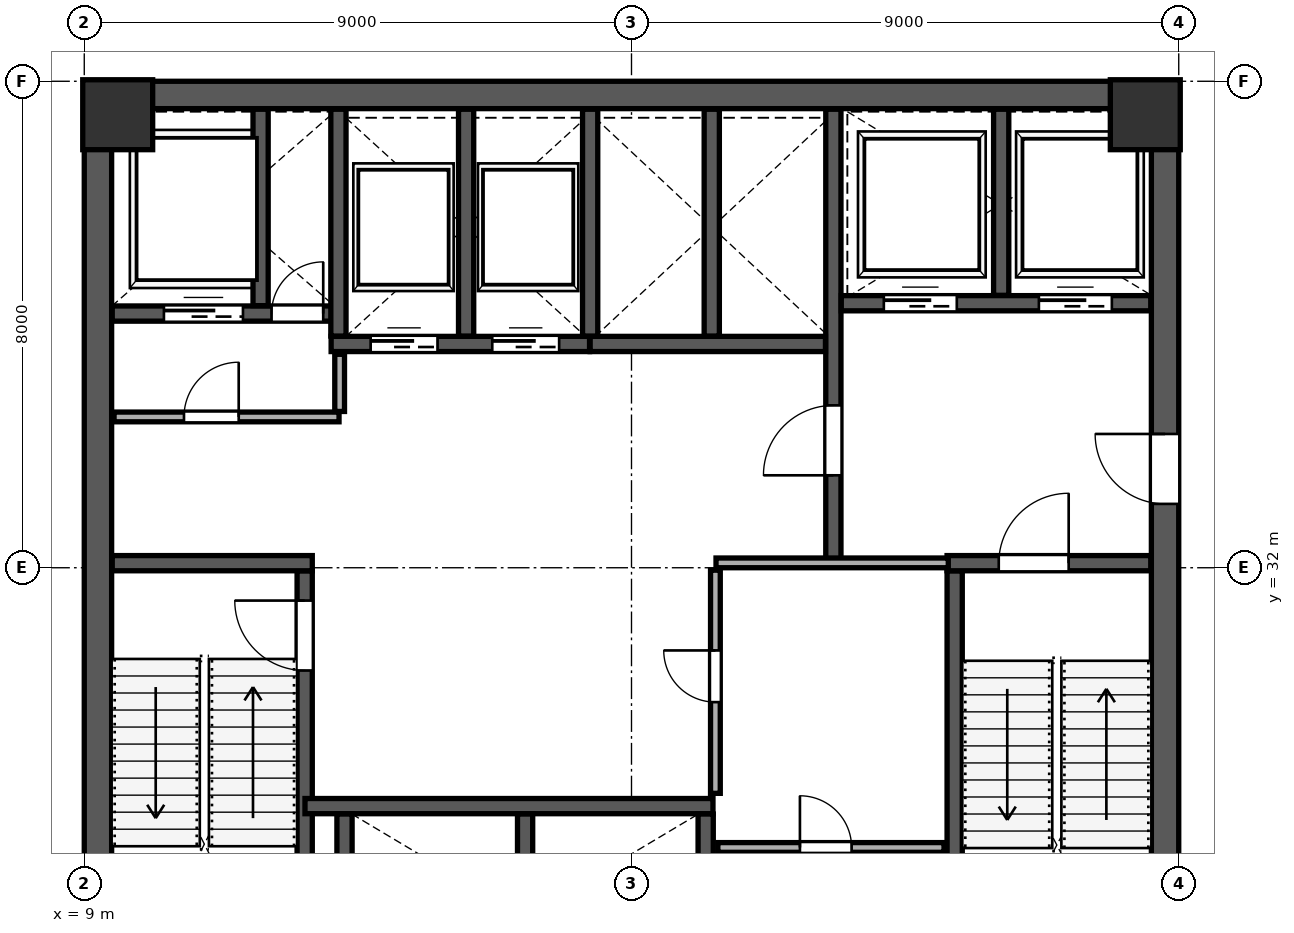
"""IFC4 building model, lengths in metres.
Left out: names, types, materials, properties, quantities, classifications, styles, units other than length and angle.
Written with IfcOpenShell. Run it as: python <this file> out.ifc"""

import sys

from ifc_helpers import new_model, si_unit, direction, frame, frame_2d, origin, origin_2d, place, context, subcontext, project, spatial, rectangle, extrude, source, transform, mapped, element, fill, save


model = new_model("IFC4")
c1 = context("Model", 3, precision=1e-05, world=origin(), true_north=direction((0.0, 1.0)))
c2 = subcontext(c1, "Body", "Model", "MODEL_VIEW")
j1 = project(units=[si_unit("LENGTHUNIT", "METRE"), si_unit("PLANEANGLEUNIT", "RADIAN")], contexts=[c1])
p1 = place(None, origin())
s1 = spatial("IfcSite", under=j1, at=p1, CompositionType="ELEMENT")
p2 = place(p1, origin())
s2 = spatial("IfcBuilding", under=s1, at=p2, CompositionType="ELEMENT")
p3 = place(p2, frame((0.0, 0.0, 133.0)))
s3 = spatial("IfcBuildingStorey", under=s2, at=p3, CompositionType="ELEMENT", Elevation=133.0)
m1 = source(origin(), c2, "Body", "SweptSolid", [
    extrude(rectangle(XDim=1.15, YDim=1.15, at=origin_2d()), origin(), (0.0, 0.0, 1.0), 4.198),
])
for number, where, z_axis, x_axis in (
    (1, (9.55, 39.45, 0.001), (0.0, 0.0, 1.0), (1.0, 0.0, 0.0)),
    (2, (26.45, 39.45, 0.001), (0.0, 0.0, 1.0), (1.0, 0.0, 0.0)),
):
    element("IfcColumn", number, at=place(p3, frame(where, z_axis=z_axis, x_axis=x_axis)), inside=s3, PredefinedType="COLUMN", context=c2, shape_type="MappedRepresentation", body=[
        mapped(m1, transform((0.0, 0.0, 0.0), scale=1.0)),
    ])
p4 = place(p3, frame((9.225, 24.45, 0.0), z_axis=(0.0, 0.0, 1.0), x_axis=(0.0, 1.0, 0.0)))
e3 = element("IfcWall", 3, at=p4, inside=s3, PredefinedType="SHEAR", context=c2, shape_type="SweptSolid", body=[
    extrude(rectangle(XDim=15.1, YDim=0.45, at=frame_2d((7.55, 0.0))), origin(), (0.0, 0.0, 1.0), 3.96),
])
p5 = place(p3, frame((26.775, 24.45, 0.0), z_axis=(0.0, 0.0, 1.0), x_axis=(0.0, 1.0, 0.0)))
e4 = element("IfcWall", 4, at=p5, inside=s3, PredefinedType="SHEAR", context=c2, shape_type="SweptSolid", body=[
    extrude(rectangle(XDim=15.1, YDim=0.45, at=frame_2d((7.55, 0.0))), origin(), (0.0, 0.0, 1.0), 3.96),
])
p6 = place(p5, frame((8.6, 0.0, 0.0)))
e5 = element("IfcOpeningElement", 5, at=p6, cuts=e4, PredefinedType="OPENING", context=c2, shape_type="SweptSolid", body=[
    extrude(rectangle(XDim=1.15, YDim=2.2, at=frame_2d((0.575, 1.1))), frame((0.0, 0.235, 0.0), z_axis=(0.0, -1.0, 0.0), x_axis=(1.0, 0.0, 0.0)), (0.0, 0.0, 1.0), 0.47),
])
p7 = place(p3, frame((9.0, 39.775, 0.0), z_axis=(0.0, 0.0, 1.0), x_axis=(1.0, 0.0, 0.0)))
e6 = element("IfcWall", 6, at=p7, inside=s3, PredefinedType="SHEAR", context=c2, shape_type="SweptSolid", body=[
    extrude(rectangle(XDim=18.0, YDim=0.45, at=frame_2d((9.0, 0.0))), origin(), (0.0, 0.0, 1.0), 3.96),
])
p8 = place(p3, frame((12.625, 24.46, 0.0), z_axis=(0.0, 0.0, 1.0), x_axis=(0.0, 1.0, 0.0)))
e7 = element("IfcWall", 7, at=p8, inside=s3, PredefinedType="SHEAR", context=c2, shape_type="SweptSolid", body=[
    extrude(rectangle(XDim=7.49, YDim=0.25, at=frame_2d((3.745, 0.0))), origin(), (0.0, 0.0, 1.0), 3.96),
])
p9 = place(p8, frame((5.85, 0.0, 0.0)))
e8 = element("IfcOpeningElement", 8, at=p9, cuts=e7, PredefinedType="OPENING", context=c2, shape_type="SweptSolid", body=[
    extrude(rectangle(XDim=1.15, YDim=2.2, at=frame_2d((0.575, 1.1))), frame((0.0, 0.135, 0.0), z_axis=(0.0, -1.0, 0.0), x_axis=(1.0, 0.0, 0.0)), (0.0, 0.0, 1.0), 0.27),
])
p10 = place(p3, frame((9.46, 32.075, 0.0), z_axis=(0.0, 0.0, 1.0), x_axis=(1.0, 0.0, 0.0)))
e9 = element("IfcWall", 9, at=p10, inside=s3, PredefinedType="SHEAR", context=c2, shape_type="SweptSolid", body=[
    extrude(rectangle(XDim=3.29, YDim=0.25, at=frame_2d((1.645, 0.0))), origin(), (0.0, 0.0, 1.0), 3.96),
])
p11 = place(p3, frame((23.315, 24.46, 0.0), z_axis=(0.0, 0.0, 1.0), x_axis=(0.0, 1.0, 0.0)))
e10 = element("IfcWall", 10, at=p11, inside=s3, PredefinedType="SHEAR", context=c2, shape_type="SweptSolid", body=[
    extrude(rectangle(XDim=7.49, YDim=0.25, at=frame_2d((3.745, 0.0))), origin(), (0.0, 0.0, 1.0), 3.96),
])
p12 = place(p3, frame((23.19, 32.075, 0.0), z_axis=(0.0, 0.0, 1.0), x_axis=(1.0, 0.0, 0.0)))
e11 = element("IfcWall", 11, at=p12, inside=s3, PredefinedType="SHEAR", context=c2, shape_type="SweptSolid", body=[
    extrude(rectangle(XDim=3.35, YDim=0.25, at=frame_2d((1.675, 0.0))), origin(), (0.0, 0.0, 1.0), 3.96),
])
p13 = place(p12, frame((0.85, 0.0, 0.0)))
e12 = element("IfcOpeningElement", 12, at=p13, cuts=e11, PredefinedType="OPENING", context=c2, shape_type="SweptSolid", body=[
    extrude(rectangle(XDim=1.15, YDim=2.2, at=frame_2d((0.575, 1.1))), frame((0.0, 0.135, 0.0), z_axis=(0.0, -1.0, 0.0), x_axis=(1.0, 0.0, 0.0)), (0.0, 0.0, 1.0), 0.27),
])
p14 = place(p3, frame((21.32, 32.12, 0.0), z_axis=(0.0, 0.0, 1.0), x_axis=(0.0, 1.0, 0.0)))
e13 = element("IfcWall", 13, at=p14, inside=s3, PredefinedType="SHEAR", context=c2, shape_type="SweptSolid", body=[
    extrude(rectangle(XDim=7.42, YDim=0.25, at=frame_2d((3.71, 0.0))), origin(), (0.0, 0.0, 1.0), 3.96),
])
p15 = place(p14, frame((1.4, 0.0, 0.0)))
e14 = element("IfcOpeningElement", 14, at=p15, cuts=e13, PredefinedType="OPENING", context=c2, shape_type="SweptSolid", body=[
    extrude(rectangle(XDim=1.15, YDim=2.2, at=frame_2d((0.575, 1.1))), frame((0.0, 0.135, 0.0), z_axis=(0.0, -1.0, 0.0), x_axis=(1.0, 0.0, 0.0)), (0.0, 0.0, 1.0), 0.27),
])
p16 = place(p3, frame((9.46, 36.18, 0.0), z_axis=(0.0, 0.0, 1.0), x_axis=(1.0, 0.0, 0.0)))
e15 = element("IfcWall", 15, at=p16, inside=s3, PredefinedType="SHEAR", context=c2, shape_type="SweptSolid", body=[
    extrude(rectangle(XDim=3.79, YDim=0.25, at=frame_2d((1.895, 0.0))), origin(), (0.0, 0.0, 1.0), 3.96),
])
p17 = place(p16, frame((2.62, 0.0, 0.0)))
e16 = element("IfcOpeningElement", 16, at=p17, cuts=e15, PredefinedType="OPENING", context=c2, shape_type="SweptSolid", body=[
    extrude(rectangle(XDim=0.85, YDim=2.1, at=frame_2d((0.425, 1.05))), frame((0.0, 0.135, 0.0), z_axis=(0.0, -1.0, 0.0), x_axis=(1.0, 0.0, 0.0)), (0.0, 0.0, 1.0), 0.27),
])
p18 = place(p16, frame((0.85, 0.0, 0.0)))
e17 = element("IfcOpeningElement", 17, at=p18, cuts=e15, PredefinedType="OPENING", context=c2, shape_type="SweptSolid", body=[
    extrude(rectangle(XDim=1.3, YDim=2.25, at=frame_2d((0.65, 1.125))), frame((0.0, 0.135, 0.0), z_axis=(0.0, -1.0, 0.0), x_axis=(1.0, 0.0, 0.0)), (0.0, 0.0, 1.0), 0.27),
])
p19 = place(p3, frame((11.9, 36.31, 0.0), z_axis=(0.0, 0.0, 1.0), x_axis=(0.0, 1.0, 0.0)))
e18 = element("IfcWall", 18, at=p19, inside=s3, PredefinedType="SHEAR", context=c2, shape_type="SweptSolid", body=[
    extrude(rectangle(XDim=3.23, YDim=0.25, at=frame_2d((1.615, 0.0))), origin(), (0.0, 0.0, 1.0), 3.96),
])
p20 = place(p3, frame((21.45, 36.35, 0.0), z_axis=(0.0, 0.0, 1.0), x_axis=(1.0, 0.0, 0.0)))
e19 = element("IfcWall", 19, at=p20, inside=s3, PredefinedType="SHEAR", context=c2, shape_type="SweptSolid", body=[
    extrude(rectangle(XDim=5.09, YDim=0.25, at=frame_2d((2.545, 0.0))), origin(), (0.0, 0.0, 1.0), 3.96),
])
p21 = place(p20, frame((0.7, 0.0, 0.0)))
e20 = element("IfcOpeningElement", 20, at=p21, cuts=e19, PredefinedType="OPENING", context=c2, shape_type="SweptSolid", body=[
    extrude(rectangle(XDim=1.2, YDim=2.2, at=frame_2d((0.6, 1.1))), frame((0.0, 0.135, 0.0), z_axis=(0.0, -1.0, 0.0), x_axis=(1.0, 0.0, 0.0)), (0.0, 0.0, 1.0), 0.27),
])
p22 = place(p20, frame((3.25, 0.0, 0.0)))
e21 = element("IfcOpeningElement", 21, at=p22, cuts=e19, PredefinedType="OPENING", context=c2, shape_type="SweptSolid", body=[
    extrude(rectangle(XDim=1.2, YDim=2.2, at=frame_2d((0.6, 1.1))), frame((0.0, 0.135, 0.0), z_axis=(0.0, -1.0, 0.0), x_axis=(1.0, 0.0, 0.0)), (0.0, 0.0, 1.0), 0.27),
])
p23 = place(p3, frame((24.08, 36.48, 0.0), z_axis=(0.0, 0.0, 1.0), x_axis=(0.0, 1.0, 0.0)))
e22 = element("IfcWall", 22, at=p23, inside=s3, PredefinedType="SHEAR", context=c2, shape_type="SweptSolid", body=[
    extrude(rectangle(XDim=3.06, YDim=0.25, at=frame_2d((1.53, 0.0))), origin(), (0.0, 0.0, 1.0), 3.96),
])
p24 = place(p3, frame((12.63, 28.08, 0.0), z_axis=(0.0, 0.0, 1.0), x_axis=(1.0, 0.0, 0.0)))
e23 = element("IfcWall", 23, at=p24, inside=s3, PredefinedType="SHEAR", context=c2, shape_type="SweptSolid", body=[
    extrude(rectangle(XDim=6.71, YDim=0.25, at=frame_2d((3.355, 0.0))), origin(), (0.0, 0.0, 1.0), 3.96),
])
for number, where, z_axis, x_axis in (
    (24, (13.28, 24.46, 0.0), (0.0, 0.0, 1.0), (0.0, 1.0, 0.0)),
    (25, (16.25, 24.46, 0.0), (0.0, 0.0, 1.0), (0.0, 1.0, 0.0)),
    (26, (19.22, 24.46, 0.0), (0.0, 0.0, 1.0), (0.0, 1.0, 0.0)),
):
    element("IfcWall", number, at=place(p3, frame(where, z_axis=z_axis, x_axis=x_axis)), inside=s3, PredefinedType="SHEAR", context=c2, shape_type="SweptSolid", body=[
        extrude(rectangle(XDim=3.49, YDim=0.25, at=frame_2d((1.745, 0.0))), origin(), (0.0, 0.0, 1.0), 3.96),
    ])
p25 = place(p3, frame((13.06, 35.68, 0.0), z_axis=(0.0, 0.0, 1.0), x_axis=(1.0, 0.0, 0.0)))
e27 = element("IfcWall", 27, at=p25, inside=s3, PredefinedType="SHEAR", context=c2, shape_type="SweptSolid", body=[
    extrude(rectangle(XDim=4.25, YDim=0.25, at=frame_2d((2.125, 0.0))), origin(), (0.0, 0.0, 1.0), 3.96),
])
p26 = place(p25, frame((0.65, 0.0, 0.0)))
e28 = element("IfcOpeningElement", 28, at=p26, cuts=e27, PredefinedType="OPENING", context=c2, shape_type="SweptSolid", body=[
    extrude(rectangle(XDim=1.1, YDim=2.2, at=frame_2d((0.55, 1.1))), frame((0.0, 0.135, 0.0), z_axis=(0.0, -1.0, 0.0), x_axis=(1.0, 0.0, 0.0)), (0.0, 0.0, 1.0), 0.27),
])
p27 = place(p25, frame((2.65, 0.0, 0.0)))
e29 = element("IfcOpeningElement", 29, at=p27, cuts=e27, PredefinedType="OPENING", context=c2, shape_type="SweptSolid", body=[
    extrude(rectangle(XDim=1.1, YDim=2.2, at=frame_2d((0.55, 1.1))), frame((0.0, 0.135, 0.0), z_axis=(0.0, -1.0, 0.0), x_axis=(1.0, 0.0, 0.0)), (0.0, 0.0, 1.0), 0.27),
])
for number, where, z_axis, x_axis in (
    (30, (13.18, 35.81, 0.0), (0.0, 0.0, 1.0), (0.0, 1.0, 0.0)),
    (31, (15.28, 35.81, 0.0), (0.0, 0.0, 1.0), (0.0, 1.0, 0.0)),
):
    element("IfcWall", number, at=place(p3, frame(where, z_axis=z_axis, x_axis=x_axis)), inside=s3, PredefinedType="SHEAR", context=c2, shape_type="SweptSolid", body=[
        extrude(rectangle(XDim=3.73, YDim=0.25, at=frame_2d((1.865, 0.0))), origin(), (0.0, 0.0, 1.0), 3.96),
    ])
p28 = place(p3, frame((17.32, 35.68, 0.0), z_axis=(0.0, 0.0, 1.0), x_axis=(1.0, 0.0, 0.0)))
e32 = element("IfcWall", 32, at=p28, inside=s3, PredefinedType="SHEAR", context=c2, shape_type="SweptSolid", body=[
    extrude(rectangle(XDim=3.87, YDim=0.25, at=frame_2d((1.935, 0.0))), origin(), (0.0, 0.0, 1.0), 3.96),
])
for number, where, z_axis, x_axis in (
    (33, (17.32, 35.81, 0.0), (0.0, 0.0, 1.0), (0.0, 1.0, 0.0)),
    (34, (19.32, 35.81, 0.0), (0.0, 0.0, 1.0), (0.0, 1.0, 0.0)),
):
    element("IfcWall", number, at=place(p3, frame(where, z_axis=z_axis, x_axis=x_axis)), inside=s3, PredefinedType="SHEAR", context=c2, shape_type="SweptSolid", body=[
        extrude(rectangle(XDim=3.73, YDim=0.25, at=frame_2d((1.865, 0.0))), origin(), (0.0, 0.0, 1.0), 3.96),
    ])
p29 = place(p3, frame((9.49, 34.48, 0.0), z_axis=(0.0, 0.0, 1.0), x_axis=(1.0, 0.0, 0.0)))
e35 = element("IfcWall", 35, at=p29, inside=s3, PredefinedType="PARTITIONING", context=c2, shape_type="SweptSolid", body=[
    extrude(rectangle(XDim=3.7, YDim=0.16, at=frame_2d((1.85, 0.0))), origin(), (0.0, 0.0, 1.0), 3.96),
])
p30 = place(p29, frame((1.15, 0.0, 0.0)))
e36 = element("IfcOpeningElement", 36, at=p30, cuts=e35, PredefinedType="OPENING", context=c2, shape_type="SweptSolid", body=[
    extrude(rectangle(XDim=0.9, YDim=2.15, at=frame_2d((0.45, 1.075))), frame((0.0, 0.09, 0.0), z_axis=(0.0, -1.0, 0.0), x_axis=(1.0, 0.0, 0.0)), (0.0, 0.0, 1.0), 0.18),
])
p31 = place(p3, frame((13.2, 34.57, 0.0), z_axis=(0.0, 0.0, 1.0), x_axis=(0.0, 1.0, 0.0)))
e37 = element("IfcWall", 37, at=p31, inside=s3, PredefinedType="PARTITIONING", context=c2, shape_type="SweptSolid", body=[
    extrude(rectangle(XDim=0.94, YDim=0.16, at=frame_2d((0.47, 0.0))), origin(), (0.0, 0.0, 1.0), 3.96),
])
p32 = place(p3, frame((19.39, 32.08, 0.0), z_axis=(0.0, 0.0, 1.0), x_axis=(1.0, 0.0, 0.0)))
e38 = element("IfcWall", 38, at=p32, inside=s3, PredefinedType="PARTITIONING", context=c2, shape_type="SweptSolid", body=[
    extrude(rectangle(XDim=3.82, YDim=0.16, at=frame_2d((1.91, 0.0))), origin(), (0.0, 0.0, 1.0), 3.96),
])
p33 = place(p3, frame((19.38, 28.29, 0.0), z_axis=(0.0, 0.0, 1.0), x_axis=(0.0, 1.0, 0.0)))
e39 = element("IfcWall", 39, at=p33, inside=s3, PredefinedType="PARTITIONING", context=c2, shape_type="SweptSolid", body=[
    extrude(rectangle(XDim=3.67, YDim=0.16, at=frame_2d((1.835, 0.0))), origin(), (0.0, 0.0, 1.0), 3.96),
])
p34 = place(p33, frame((1.5, 0.0, 0.0)))
e40 = element("IfcOpeningElement", 40, at=p34, cuts=e39, PredefinedType="OPENING", context=c2, shape_type="SweptSolid", body=[
    extrude(rectangle(XDim=0.85, YDim=2.1, at=frame_2d((0.425, 1.05))), frame((0.0, 0.09, 0.0), z_axis=(0.0, -1.0, 0.0), x_axis=(1.0, 0.0, 0.0)), (0.0, 0.0, 1.0), 0.18),
])
p35 = place(p3, frame((19.42, 27.4, 0.0), z_axis=(0.0, 0.0, 1.0), x_axis=(1.0, 0.0, 0.0)))
e41 = element("IfcWall", 41, at=p35, inside=s3, PredefinedType="PARTITIONING", context=c2, shape_type="SweptSolid", body=[
    extrude(rectangle(XDim=3.72, YDim=0.16, at=frame_2d((1.86, 0.0))), origin(), (0.0, 0.0, 1.0), 3.96),
])
p36 = place(p35, frame((1.35, 0.0, 0.0)))
e42 = element("IfcOpeningElement", 42, at=p36, cuts=e41, PredefinedType="OPENING", context=c2, shape_type="SweptSolid", body=[
    extrude(rectangle(XDim=0.85, YDim=2.1, at=frame_2d((0.425, 1.05))), frame((0.0, 0.09, 0.0), z_axis=(0.0, -1.0, 0.0), x_axis=(1.0, 0.0, 0.0)), (0.0, 0.0, 1.0), 0.18),
])
p37 = place(p3, frame((10.184, 47.719, 0.0), z_axis=(0.0, 0.0, 1.0), x_axis=(0.939691432235, -0.342023408826, 0.0)))
e43 = element("IfcWall", 43, at=p37, inside=s3, PredefinedType="PARTITIONING", context=c2, shape_type="SweptSolid", body=[
    extrude(rectangle(XDim=25.87, YDim=0.135, at=frame_2d((12.935, 0.0))), origin(), (0.0, 0.0, 1.0), 3.96),
])
p38 = place(p37, frame((18.8, 0.0, 0.0)))
e44 = element("IfcOpeningElement", 44, at=p38, cuts=e43, PredefinedType="OPENING", context=c2, shape_type="SweptSolid", body=[
    extrude(rectangle(XDim=0.95, YDim=2.15, at=frame_2d((0.475, 1.075))), frame((0.0, 0.078, 0.0), z_axis=(0.0, -1.0, 0.0), x_axis=(1.0, 0.0, 0.0)), (0.0, 0.0, 1.0), 0.155),
])
p39 = place(p3, frame((2.362, 26.345, 0.0), z_axis=(0.0, 0.0, 1.0), x_axis=(0.342021727767, 0.939692044095, 0.0)))
e45 = element("IfcWall", 45, at=p39, inside=s3, PredefinedType="PARTITIONING", context=c2, shape_type="SweptSolid", body=[
    extrude(rectangle(XDim=22.72, YDim=0.1, at=frame_2d((11.36, 0.0))), origin(), (0.0, 0.0, 1.0), 3.96),
])
p40 = place(p39, frame((6.2, 0.0, 0.0)))
e46 = element("IfcOpeningElement", 46, at=p40, cuts=e45, PredefinedType="OPENING", context=c2, shape_type="SweptSolid", body=[
    extrude(rectangle(XDim=0.95, YDim=2.15, at=frame_2d((0.475, 1.075))), frame((0.0, 0.06, 0.0), z_axis=(0.0, -1.0, 0.0), x_axis=(1.0, 0.0, 0.0)), (0.0, 0.0, 1.0), 0.12),
])
p41 = place(p3, frame((24.64, 11.681, 0.0), z_axis=(0.0, 0.0, 1.0), x_axis=(0.342014151498, 0.939694801611, 0.0)))
e47 = element("IfcWall", 47, at=p41, inside=s3, PredefinedType="PARTITIONING", context=c2, shape_type="SweptSolid", body=[
    extrude(rectangle(XDim=20.68, YDim=0.16, at=frame_2d((10.34, 0.0))), origin(), (0.0, 0.0, 1.0), 3.96),
])
m2 = source(origin(), c2, "Body", "SweptSolid", [
    extrude(rectangle(XDim=1.15, YDim=2.2, at=frame_2d((0.575, 1.1))), frame((0.0, 0.025, 0.0), z_axis=(0.0, -1.0, 0.0), x_axis=(1.0, 0.0, 0.0)), (0.0, 0.0, 1.0), 0.05),
])
p42 = place(p9, origin())
e48 = element("IfcDoor", 48, at=p42, inside=s3, OperationType="SINGLE_SWING_RIGHT", PredefinedType="DOOR", context=c2, shape_type="MappedRepresentation", body=[
    mapped(m2, transform((0.0, 0.0, 0.0), scale=1.0)),
])
fill(e8, e48)
m3 = source(origin(), c2, "Body", "SweptSolid", [
    extrude(rectangle(XDim=1.15, YDim=2.2, at=frame_2d((0.575, 1.1))), frame((0.0, 0.025, 0.0), z_axis=(0.0, -1.0, 0.0), x_axis=(1.0, 0.0, 0.0)), (0.0, 0.0, 1.0), 0.05),
])
p43 = place(p15, origin())
e49 = element("IfcDoor", 49, at=p43, inside=s3, OperationType="SINGLE_SWING_LEFT", PredefinedType="DOOR", context=c2, shape_type="MappedRepresentation", body=[
    mapped(m3, transform((0.0, 0.0, 0.0), scale=1.0)),
])
fill(e14, e49)
p44 = place(p13, origin())
e50 = element("IfcDoor", 50, at=p44, inside=s3, OperationType="SINGLE_SWING_RIGHT", PredefinedType="DOOR", context=c2, shape_type="MappedRepresentation", body=[
    mapped(m2, transform((0.0, 0.0, 0.0), scale=1.0)),
])
fill(e12, e50)
p45 = place(p6, origin())
e51 = element("IfcDoor", 51, at=p45, inside=s3, OperationType="SINGLE_SWING_RIGHT", PredefinedType="DOOR", context=c2, shape_type="MappedRepresentation", body=[
    mapped(m3, transform((0.0, 0.0, 0.0), scale=1.0)),
])
fill(e5, e51)
m4 = source(origin(), c2, "Body", "SweptSolid", [
    extrude(rectangle(XDim=0.85, YDim=2.1, at=frame_2d((0.425, 1.05))), frame((0.0, 0.025, 0.0), z_axis=(0.0, -1.0, 0.0), x_axis=(1.0, 0.0, 0.0)), (0.0, 0.0, 1.0), 0.05),
])
p46 = place(p17, origin())
e52 = element("IfcDoor", 52, at=p46, inside=s3, OperationType="SINGLE_SWING_RIGHT", PredefinedType="DOOR", context=c2, shape_type="MappedRepresentation", body=[
    mapped(m4, transform((0.0, 0.0, 0.0), scale=1.0)),
])
fill(e16, e52)
m5 = source(origin(), c2, "Body", "SweptSolid", [
    extrude(rectangle(XDim=1.1, YDim=2.2, at=frame_2d((0.55, 1.1))), frame((0.0, 0.025, 0.0), z_axis=(0.0, -1.0, 0.0), x_axis=(1.0, 0.0, 0.0)), (0.0, 0.0, 1.0), 0.05),
])
p47 = place(p26, origin())
e53 = element("IfcDoor", 53, at=p47, inside=s3, OperationType="SLIDING_TO_LEFT", PredefinedType="DOOR", context=c2, shape_type="MappedRepresentation", body=[
    mapped(m5, transform((0.0, 0.0, 0.0), scale=1.0)),
])
fill(e28, e53)
p48 = place(p27, origin())
e54 = element("IfcDoor", 54, at=p48, inside=s3, OperationType="SLIDING_TO_RIGHT", PredefinedType="DOOR", context=c2, shape_type="MappedRepresentation", body=[
    mapped(m5, transform((0.0, 0.0, 0.0), scale=1.0)),
])
fill(e29, e54)
m6 = source(origin(), c2, "Body", "SweptSolid", [
    extrude(rectangle(XDim=1.2, YDim=2.2, at=frame_2d((0.6, 1.1))), frame((0.0, 0.025, 0.0), z_axis=(0.0, -1.0, 0.0), x_axis=(1.0, 0.0, 0.0)), (0.0, 0.0, 1.0), 0.05),
])
p49 = place(p21, origin())
e55 = element("IfcDoor", 55, at=p49, inside=s3, OperationType="SLIDING_TO_LEFT", PredefinedType="DOOR", context=c2, shape_type="MappedRepresentation", body=[
    mapped(m6, transform((0.0, 0.0, 0.0), scale=1.0)),
])
fill(e20, e55)
p50 = place(p22, origin())
e56 = element("IfcDoor", 56, at=p50, inside=s3, OperationType="SLIDING_TO_RIGHT", PredefinedType="DOOR", context=c2, shape_type="MappedRepresentation", body=[
    mapped(m6, transform((0.0, 0.0, 0.0), scale=1.0)),
])
fill(e21, e56)
m7 = source(origin(), c2, "Body", "SweptSolid", [
    extrude(rectangle(XDim=1.3, YDim=2.25, at=frame_2d((0.65, 1.125))), frame((0.0, 0.025, 0.0), z_axis=(0.0, -1.0, 0.0), x_axis=(1.0, 0.0, 0.0)), (0.0, 0.0, 1.0), 0.05),
])
p51 = place(p18, origin())
e57 = element("IfcDoor", 57, at=p51, inside=s3, OperationType="SLIDING_TO_LEFT", PredefinedType="DOOR", context=c2, shape_type="MappedRepresentation", body=[
    mapped(m7, transform((0.0, 0.0, 0.0), scale=1.0)),
])
fill(e17, e57)
m8 = source(origin(), c2, "Body", "SweptSolid", [
    extrude(rectangle(XDim=0.9, YDim=2.15, at=frame_2d((0.45, 1.075))), frame((0.0, 0.025, 0.0), z_axis=(0.0, -1.0, 0.0), x_axis=(1.0, 0.0, 0.0)), (0.0, 0.0, 1.0), 0.05),
])
p52 = place(p30, origin())
e58 = element("IfcDoor", 58, at=p52, inside=s3, OperationType="SINGLE_SWING_RIGHT", PredefinedType="DOOR", context=c2, shape_type="MappedRepresentation", body=[
    mapped(m8, transform((0.0, 0.0, 0.0), scale=1.0)),
])
fill(e36, e58)
p53 = place(p36, origin())
e59 = element("IfcDoor", 59, at=p53, inside=s3, OperationType="SINGLE_SWING_LEFT", PredefinedType="DOOR", context=c2, shape_type="MappedRepresentation", body=[
    mapped(m4, transform((0.0, 0.0, 0.0), scale=1.0)),
])
fill(e42, e59)
p54 = place(p34, origin())
e60 = element("IfcDoor", 60, at=p54, inside=s3, OperationType="SINGLE_SWING_RIGHT", PredefinedType="DOOR", context=c2, shape_type="MappedRepresentation", body=[
    mapped(m4, transform((0.0, 0.0, 0.0), scale=1.0)),
])
fill(e40, e60)
save(model, sys.argv[1])
